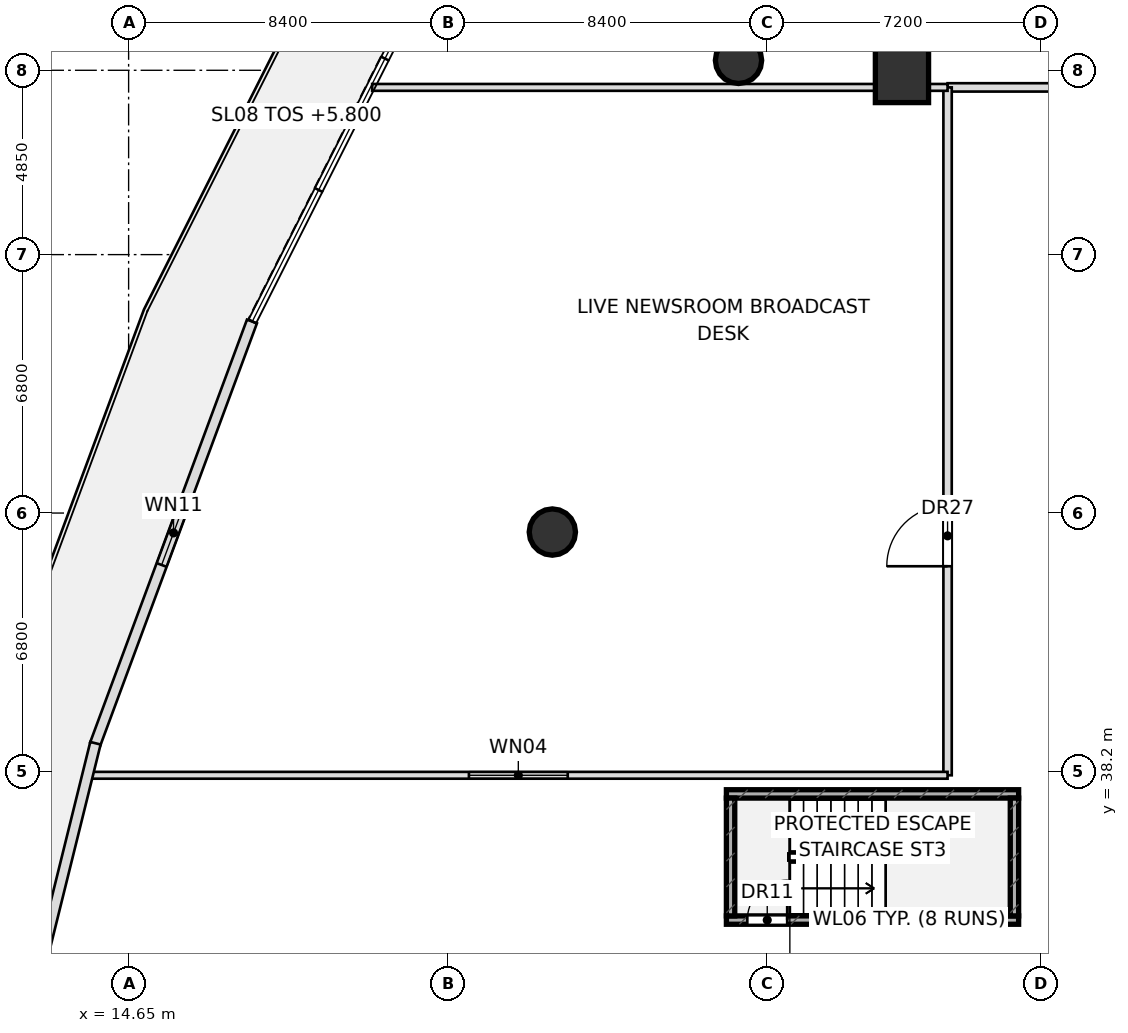
"""IFC4 building model, lengths in metres.
Left out: names, types, materials, properties, quantities, classifications, styles, units other than length and angle.
Written with IfcOpenShell. Run it as: python <this file> out.ifc"""

import sys

from ifc_helpers import new_model, si_unit, direction, frame, frame_2d, origin, origin_2d, place, context, subcontext, project, spatial, rectangle, hollow_circle, extrude, element, fill, save


model = new_model("IFC4")
c1 = context("Model", 3, precision=1e-05, world=origin(), true_north=direction((0.0, 1.0)))
c2 = subcontext(c1, "Body", "Model", "MODEL_VIEW")
j1 = project(units=[si_unit("LENGTHUNIT", "METRE"), si_unit("PLANEANGLEUNIT", "RADIAN")], contexts=[c1])
p1 = place(None, origin())
s1 = spatial("IfcSite", under=j1, at=p1, CompositionType="ELEMENT")
p2 = place(p1, origin())
s2 = spatial("IfcBuilding", under=s1, at=p2, CompositionType="ELEMENT")
p3 = place(p2, frame((0.0, 0.0, 5.8)))
s3 = spatial("IfcBuildingStorey", under=s2, at=p3, CompositionType="ELEMENT", Elevation=5.8)
p4 = place(p3, frame((30.38, 34.29, 0.0), z_axis=(0.0, 0.0, 1.0), x_axis=(1.0, 0.0, 0.0)))
e1 = element("IfcWall", 1, at=p4, inside=s3, PredefinedType="SHEAR", context=c2, shape_type="SweptSolid", body=[
    extrude(rectangle(XDim=7.69, YDim=0.22, at=frame_2d((3.845, 0.0))), origin(), (0.0, 0.0, 1.0), 5.25),
])
p5 = place(p4, frame((0.55, 0.0, 0.0)))
e2 = element("IfcOpeningElement", 2, at=p5, cuts=e1, PredefinedType="OPENING", context=c2, shape_type="SweptSolid", body=[
    extrude(rectangle(XDim=1.05, YDim=2.2, at=frame_2d((0.525, 1.1))), frame((0.0, 0.12, 0.0), z_axis=(0.0, -1.0, 0.0), x_axis=(1.0, 0.0, 0.0)), (0.0, 0.0, 1.0), 0.24),
])
p6 = place(p3, frame((30.38, 37.61, 0.0), z_axis=(0.0, 0.0, 1.0), x_axis=(1.0, 0.0, 0.0)))
e3 = element("IfcWall", 3, at=p6, inside=s3, PredefinedType="SHEAR", context=c2, shape_type="SweptSolid", body=[
    extrude(rectangle(XDim=7.69, YDim=0.22, at=frame_2d((3.845, 0.0))), origin(), (0.0, 0.0, 1.0), 5.25),
])
for number, where, z_axis, x_axis in (
    (4, (37.96, 34.4, 0.0), (0.0, 0.0, 1.0), (0.0, 1.0, 0.0)),
    (5, (30.49, 34.4, 0.0), (0.0, 0.0, 1.0), (0.0, 1.0, 0.0)),
):
    element("IfcWall", number, at=place(p3, frame(where, z_axis=z_axis, x_axis=x_axis)), inside=s3, PredefinedType="SHEAR", context=c2, shape_type="SweptSolid", body=[
        extrude(rectangle(XDim=3.1, YDim=0.22, at=frame_2d((1.55, 0.0))), origin(), (0.0, 0.0, 1.0), 5.25),
    ])
p7 = place(p3, frame((35.0, 56.5, 0.0), z_axis=(0.0, 0.0, 1.0), x_axis=(1.0, 0.0, 0.0)))
e6 = element("IfcColumn", 6, at=p7, inside=s3, PredefinedType="COLUMN", context=c2, shape_type="SweptSolid", body=[
    extrude(rectangle(XDim=1.4, YDim=1.4, at=origin_2d()), origin(), (0.0, 0.0, 1.0), 5.25),
])
for number, where, z_axis, x_axis in (
    (7, (30.699, 56.911, 0.0), (0.0, 0.0, 1.0), (1.0, 0.0, 0.0)),
    (8, (25.8, 44.5, 0.0), (0.0, 0.0, 1.0), (1.0, 0.0, 0.0)),
):
    element("IfcColumn", number, at=place(p3, frame(where, z_axis=z_axis, x_axis=x_axis)), inside=s3, PredefinedType="COLUMN", context=c2, shape_type="SweptSolid", body=[
        extrude(hollow_circle(Radius=0.61, WallThickness=0.05, at=origin_2d()), origin(), (0.0, 0.0, 1.0), 5.25),
    ])
p8 = place(p3, frame((36.2, 56.2, 0.0), z_axis=(0.0, 0.0, 1.0), x_axis=(1.0, 0.0, 0.0)))
e9 = element("IfcWall", 9, at=p8, inside=s3, PredefinedType="PARTITIONING", context=c2, shape_type="SweptSolid", body=[
    extrude(rectangle(XDim=22.6, YDim=0.22, at=frame_2d((11.3, 0.0))), origin(), (0.0, 0.0, 1.0), 5.25),
])
p9 = place(p8, frame((6.5, 0.0, 0.0)))
e10 = element("IfcOpeningElement", 10, at=p9, cuts=e9, PredefinedType="OPENING", context=c2, shape_type="SweptSolid", body=[
    extrude(rectangle(XDim=1.6, YDim=2.3, at=frame_2d((0.8, 1.15))), frame((0.0, 0.12, 0.0), z_axis=(0.0, -1.0, 0.0), x_axis=(1.0, 0.0, 0.0)), (0.0, 0.0, 1.0), 0.24),
])
p10 = place(p3, frame((36.2, 38.1, 0.0), z_axis=(0.0, 0.0, 1.0), x_axis=(0.0, 1.0, 0.0)))
e11 = element("IfcWall", 11, at=p10, inside=s3, PredefinedType="PARTITIONING", context=c2, shape_type="SweptSolid", body=[
    extrude(rectangle(XDim=18.1, YDim=0.22, at=frame_2d((9.05, 0.0))), origin(), (0.0, 0.0, 1.0), 4.325),
])
p11 = place(p10, frame((5.5, 0.0, 0.0)))
e12 = element("IfcOpeningElement", 12, at=p11, cuts=e11, PredefinedType="OPENING", context=c2, shape_type="SweptSolid", body=[
    extrude(rectangle(XDim=1.6, YDim=2.3, at=frame_2d((0.8, 1.15))), frame((0.0, 0.12, 0.0), z_axis=(0.0, -1.0, 0.0), x_axis=(1.0, 0.0, 0.0)), (0.0, 0.0, 1.0), 0.24),
])
p12 = place(p3, frame((13.609, 38.1, 0.0), z_axis=(0.0, 0.0, 1.0), x_axis=(1.0, 0.0, 0.0)))
e13 = element("IfcWall", 13, at=p12, inside=s3, PredefinedType="PARTITIONING", context=c2, shape_type="SweptSolid", body=[
    extrude(rectangle(XDim=22.591, YDim=0.18, at=frame_2d((11.295, 0.0))), origin(), (0.0, 0.0, 1.0), 4.425),
])
p13 = place(p12, frame((9.995, 0.0, 1.05)))
e14 = element("IfcOpeningElement", 14, at=p13, cuts=e13, PredefinedType="OPENING", context=c2, shape_type="SweptSolid", body=[
    extrude(rectangle(XDim=2.6, YDim=1.5, at=frame_2d((1.3, 0.75))), frame((0.0, 0.1, 0.0), z_axis=(0.0, -1.0, 0.0), x_axis=(1.0, 0.0, 0.0)), (0.0, 0.0, 1.0), 0.2),
])
p14 = place(p3, frame((21.059, 56.2, 0.0), z_axis=(0.0, 0.0, 1.0), x_axis=(1.0, 0.0, 0.0)))
e15 = element("IfcWall", 15, at=p14, inside=s3, PredefinedType="PARTITIONING", context=c2, shape_type="SweptSolid", body=[
    extrude(rectangle(XDim=15.141, YDim=0.18, at=frame_2d((7.571, 0.0))), origin(), (0.0, 0.0, 1.0), 4.425),
])
p15 = place(p3, frame((17.896, 50.041, 0.0), z_axis=(0.0, 0.0, 1.0), x_axis=(-0.347786696803, -0.937573684319, 0.0)))
e16 = element("IfcWall", 16, at=p15, inside=s3, PredefinedType="STANDARD", context=c2, shape_type="SweptSolid", body=[
    extrude(rectangle(XDim=11.867, YDim=0.28, at=frame_2d((5.934, 0.0))), origin(), (0.0, 0.0, 1.0), 5.25),
])
p16 = place(p15, frame((5.034, 0.0, 1.0)))
e17 = element("IfcOpeningElement", 17, at=p16, cuts=e16, PredefinedType="OPENING", context=c2, shape_type="SweptSolid", body=[
    extrude(rectangle(XDim=1.8, YDim=2.2, at=frame_2d((0.9, 1.1))), frame((0.0, 0.15, 0.0), z_axis=(0.0, -1.0, 0.0), x_axis=(1.0, 0.0, 0.0)), (0.0, 0.0, 1.0), 0.3),
])
p17 = place(p3, frame((13.777, 38.943, 0.0), z_axis=(0.0, 0.0, 1.0), x_axis=(-0.240569487488, -0.970631918747, 0.0)))
e18 = element("IfcWall", 18, at=p17, inside=s3, PredefinedType="STANDARD", context=c2, shape_type="SweptSolid", body=[
    extrude(rectangle(XDim=11.807, YDim=0.28, at=frame_2d((5.903, 0.0))), origin(), (0.0, 0.0, 1.0), 5.25),
])
p18 = place(p5, origin())
e19 = element("IfcDoor", 19, at=p18, inside=s3, OperationType="SINGLE_SWING_RIGHT", PredefinedType="DOOR", context=c2, shape_type="SweptSolid", body=[
    extrude(rectangle(XDim=1.05, YDim=2.2, at=frame_2d((0.525, 1.1))), frame((0.0, 0.025, 0.0), z_axis=(0.0, -1.0, 0.0), x_axis=(1.0, 0.0, 0.0)), (0.0, 0.0, 1.0), 0.05),
])
fill(e2, e19)
p19 = place(p11, origin())
e20 = element("IfcDoor", 20, at=p19, inside=s3, OperationType="SINGLE_SWING_LEFT", PredefinedType="DOOR", context=c2, shape_type="SweptSolid", body=[
    extrude(rectangle(XDim=1.6, YDim=2.3, at=frame_2d((0.8, 1.15))), frame((0.0, 0.025, 0.0), z_axis=(0.0, -1.0, 0.0), x_axis=(1.0, 0.0, 0.0)), (0.0, 0.0, 1.0), 0.05),
])
fill(e12, e20)
p20 = place(p16, origin())
e21 = element("IfcWindow", 21, at=p20, inside=s3, PartitioningType="SINGLE_PANEL", PredefinedType="WINDOW", context=c2, shape_type="SweptSolid", body=[
    extrude(rectangle(XDim=1.8, YDim=2.2, at=frame_2d((0.9, 1.1))), frame((0.0, 0.03, 0.0), z_axis=(0.0, -1.0, 0.0), x_axis=(1.0, 0.0, 0.0)), (0.0, 0.0, 1.0), 0.06),
])
fill(e17, e21)
p21 = place(p13, origin())
e22 = element("IfcWindow", 22, at=p21, inside=s3, PartitioningType="SINGLE_PANEL", PredefinedType="WINDOW", context=c2, shape_type="SweptSolid", body=[
    extrude(rectangle(XDim=2.6, YDim=1.5, at=frame_2d((1.3, 0.75))), frame((0.0, 0.03, 0.0), z_axis=(0.0, -1.0, 0.0), x_axis=(1.0, 0.0, 0.0)), (0.0, 0.0, 1.0), 0.06),
])
fill(e14, e22)
save(model, sys.argv[1])
